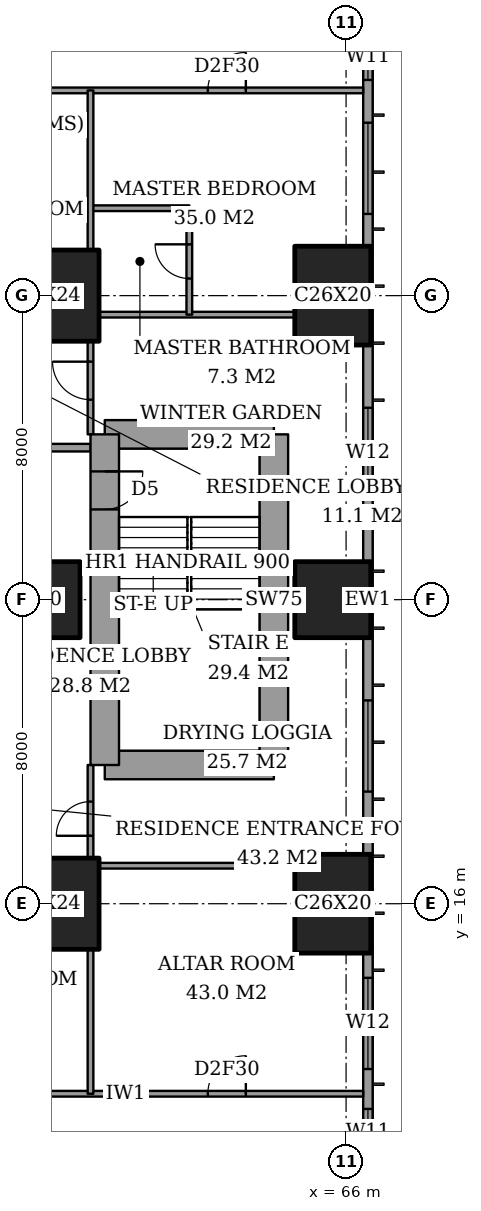
"""IFC4 building model, lengths in metres.
Left out: names, types, materials, properties, quantities, classifications, styles, units other than length and angle.
Written with IfcOpenShell. Run it as: python <this file> out.ifc"""

import sys

from ifc_helpers import new_model, si_unit, direction, frame, frame_2d, origin, origin_2d, place, context, subcontext, project, spatial, rectangle, extrude, element, fill, save


model = new_model("IFC4")
c1 = context("Model", 3, precision=1e-05, world=origin(), true_north=direction((0.0, 1.0)))
c2 = subcontext(c1, "Body", "Model", "MODEL_VIEW")
j1 = project(units=[si_unit("LENGTHUNIT", "METRE"), si_unit("PLANEANGLEUNIT", "RADIAN")], contexts=[c1])
p1 = place(None, origin())
s1 = spatial("IfcSite", under=j1, at=p1, CompositionType="ELEMENT")
p2 = place(p1, origin())
s2 = spatial("IfcBuilding", under=s1, at=p2, CompositionType="ELEMENT")
p3 = place(p2, frame((0.0, 0.0, 161.0)))
s3 = spatial("IfcBuildingStorey", under=s2, at=p3, CompositionType="ELEMENT", Elevation=161.0)
p4 = place(p3, frame((58.0, 16.0, 0.0), z_axis=(0.0, 0.0, 1.0), x_axis=(1.0, 0.0, 0.0)))
e1 = element("IfcColumn", 1, at=p4, inside=s3, PredefinedType="COLUMN", context=c2, shape_type="SweptSolid", body=[
    extrude(rectangle(XDim=3.0, YDim=2.4, at=origin_2d()), origin(), (0.0, 0.0, 1.0), 3.6),
])
p5 = place(p3, frame((58.0, 24.0, 0.0), z_axis=(0.0, 0.0, 1.0), x_axis=(1.0, 0.0, 0.0)))
e2 = element("IfcColumn", 2, at=p5, inside=s3, PredefinedType="COLUMN", context=c2, shape_type="SweptSolid", body=[
    extrude(rectangle(XDim=2.0, YDim=2.0, at=origin_2d()), origin(), (0.0, 0.0, 1.0), 3.6),
])
p6 = place(p3, frame((58.0, 32.0, 0.0), z_axis=(0.0, 0.0, 1.0), x_axis=(1.0, 0.0, 0.0)))
e3 = element("IfcColumn", 3, at=p6, inside=s3, PredefinedType="COLUMN", context=c2, shape_type="SweptSolid", body=[
    extrude(rectangle(XDim=3.0, YDim=2.4, at=origin_2d()), origin(), (0.0, 0.0, 1.0), 3.6),
])
p7 = place(p3, frame((65.65, 16.0, 0.0), z_axis=(0.0, 0.0, 1.0), x_axis=(0.0, 1.0, 0.0)))
e4 = element("IfcColumn", 4, at=p7, inside=s3, PredefinedType="COLUMN", context=c2, shape_type="SweptSolid", body=[
    extrude(rectangle(XDim=2.6, YDim=2.0, at=origin_2d()), origin(), (0.0, 0.0, 1.0), 3.6),
])
p8 = place(p3, frame((65.65, 24.0, 0.0), z_axis=(0.0, 0.0, 1.0), x_axis=(1.0, 0.0, 0.0)))
e5 = element("IfcColumn", 5, at=p8, inside=s3, PredefinedType="COLUMN", context=c2, shape_type="SweptSolid", body=[
    extrude(rectangle(XDim=2.0, YDim=2.0, at=origin_2d()), origin(), (0.0, 0.0, 1.0), 3.6),
])
p9 = place(p3, frame((65.65, 32.0, 0.0), z_axis=(0.0, 0.0, 1.0), x_axis=(0.0, 1.0, 0.0)))
e6 = element("IfcColumn", 6, at=p9, inside=s3, PredefinedType="COLUMN", context=c2, shape_type="SweptSolid", body=[
    extrude(rectangle(XDim=2.6, YDim=2.0, at=origin_2d()), origin(), (0.0, 0.0, 1.0), 3.6),
])
p10 = place(p3, frame((59.65, 19.65, 0.0), z_axis=(0.0, 0.0, 1.0), x_axis=(1.0, 0.0, 0.0)))
e7 = element("IfcWall", 7, at=p10, inside=s3, PredefinedType="SHEAR", context=c2, shape_type="SweptSolid", body=[
    extrude(rectangle(XDim=4.45, YDim=0.75, at=frame_2d((2.225, 0.0))), origin(), (0.0, 0.0, 1.0), 3.6),
])
p11 = place(p3, frame((64.1, 19.65, 0.0), z_axis=(0.0, 0.0, 1.0), x_axis=(0.0, 1.0, 0.0)))
e8 = element("IfcWall", 8, at=p11, inside=s3, PredefinedType="SHEAR", context=c2, shape_type="SweptSolid", body=[
    extrude(rectangle(XDim=8.7, YDim=0.75, at=frame_2d((4.35, 0.0))), origin(), (0.0, 0.0, 1.0), 3.6),
])
p12 = place(p3, frame((64.1, 28.35, 0.0), z_axis=(0.0, 0.0, 1.0), x_axis=(-1.0, 0.0, 0.0)))
e9 = element("IfcWall", 9, at=p12, inside=s3, PredefinedType="SHEAR", context=c2, shape_type="SweptSolid", body=[
    extrude(rectangle(XDim=4.45, YDim=0.75, at=frame_2d((2.225, 0.0))), origin(), (0.0, 0.0, 1.0), 3.6),
])
p13 = place(p3, frame((59.65, 28.35, 0.0), z_axis=(0.0, 0.0, 1.0), x_axis=(0.0, -1.0, 0.0)))
e10 = element("IfcWall", 10, at=p13, inside=s3, PredefinedType="SHEAR", context=c2, shape_type="SweptSolid", body=[
    extrude(rectangle(XDim=8.7, YDim=0.75, at=frame_2d((4.35, 0.0))), origin(), (0.0, 0.0, 1.0), 3.6),
])
p14 = place(p13, frame((0.975, 0.0, 0.0)))
e11 = element("IfcOpeningElement", 11, at=p14, cuts=e10, PredefinedType="OPENING", context=c2, shape_type="SweptSolid", body=[
    extrude(rectangle(XDim=1.0, YDim=2.1, at=frame_2d((0.5, 1.05))), frame((0.0, 0.385, 0.0), z_axis=(0.0, -1.0, 0.0), x_axis=(1.0, 0.0, 0.0)), (0.0, 0.0, 1.0), 0.77),
])
p15 = place(p3, frame((66.575, 3.175, 0.0), z_axis=(0.0, 0.0, 1.0), x_axis=(0.0, 1.0, 0.0)))
e12 = element("IfcWall", 12, at=p15, inside=s3, PredefinedType="SOLIDWALL", context=c2, shape_type="SweptSolid", body=[
    extrude(rectangle(XDim=41.65, YDim=0.25, at=frame_2d((20.825, 0.0))), origin(), (0.0, 0.0, 1.0), 3.6),
])
p16 = place(p15, frame((0.775, 0.0, 0.4)))
e13 = element("IfcOpeningElement", 13, at=p16, cuts=e12, PredefinedType="OPENING", context=c2, shape_type="SweptSolid", body=[
    extrude(rectangle(XDim=2.4, YDim=2.2, at=frame_2d((1.2, 1.1))), frame((0.0, 0.135, 0.0), z_axis=(0.0, -1.0, 0.0), x_axis=(1.0, 0.0, 0.0)), (0.0, 0.0, 1.0), 0.27),
])
p17 = place(p15, frame((6.225, 0.0, 0.4)))
e14 = element("IfcOpeningElement", 14, at=p17, cuts=e12, PredefinedType="OPENING", context=c2, shape_type="SweptSolid", body=[
    extrude(rectangle(XDim=1.2, YDim=2.2, at=frame_2d((0.6, 1.1))), frame((0.0, 0.135, 0.0), z_axis=(0.0, -1.0, 0.0), x_axis=(1.0, 0.0, 0.0)), (0.0, 0.0, 1.0), 0.27),
])
p18 = place(p15, frame((8.475, 0.0, 0.4)))
e15 = element("IfcOpeningElement", 15, at=p18, cuts=e12, PredefinedType="OPENING", context=c2, shape_type="SweptSolid", body=[
    extrude(rectangle(XDim=2.4, YDim=2.2, at=frame_2d((1.2, 1.1))), frame((0.0, 0.135, 0.0), z_axis=(0.0, -1.0, 0.0), x_axis=(1.0, 0.0, 0.0)), (0.0, 0.0, 1.0), 0.27),
])
p19 = place(p15, frame((15.775, 0.0, 0.4)))
e16 = element("IfcOpeningElement", 16, at=p19, cuts=e12, PredefinedType="OPENING", context=c2, shape_type="SweptSolid", body=[
    extrude(rectangle(XDim=2.4, YDim=2.2, at=frame_2d((1.2, 1.1))), frame((0.0, 0.135, 0.0), z_axis=(0.0, -1.0, 0.0), x_axis=(1.0, 0.0, 0.0)), (0.0, 0.0, 1.0), 0.27),
])
p20 = place(p15, frame((23.475, 0.0, 0.4)))
e17 = element("IfcOpeningElement", 17, at=p20, cuts=e12, PredefinedType="OPENING", context=c2, shape_type="SweptSolid", body=[
    extrude(rectangle(XDim=2.4, YDim=2.2, at=frame_2d((1.2, 1.1))), frame((0.0, 0.135, 0.0), z_axis=(0.0, -1.0, 0.0), x_axis=(1.0, 0.0, 0.0)), (0.0, 0.0, 1.0), 0.27),
])
p21 = place(p15, frame((30.975, 0.0, 0.4)))
e18 = element("IfcOpeningElement", 18, at=p21, cuts=e12, PredefinedType="OPENING", context=c2, shape_type="SweptSolid", body=[
    extrude(rectangle(XDim=2.4, YDim=2.2, at=frame_2d((1.2, 1.1))), frame((0.0, 0.135, 0.0), z_axis=(0.0, -1.0, 0.0), x_axis=(1.0, 0.0, 0.0)), (0.0, 0.0, 1.0), 0.27),
])
p22 = place(p15, frame((34.5, 0.0, 0.4)))
e19 = element("IfcOpeningElement", 19, at=p22, cuts=e12, PredefinedType="OPENING", context=c2, shape_type="SweptSolid", body=[
    extrude(rectangle(XDim=1.2, YDim=2.2, at=frame_2d((0.6, 1.1))), frame((0.0, 0.135, 0.0), z_axis=(0.0, -1.0, 0.0), x_axis=(1.0, 0.0, 0.0)), (0.0, 0.0, 1.0), 0.27),
])
p23 = place(p15, frame((38.475, 0.0, 0.4)))
e20 = element("IfcOpeningElement", 20, at=p23, cuts=e12, PredefinedType="OPENING", context=c2, shape_type="SweptSolid", body=[
    extrude(rectangle(XDim=2.4, YDim=2.2, at=frame_2d((1.2, 1.1))), frame((0.0, 0.135, 0.0), z_axis=(0.0, -1.0, 0.0), x_axis=(1.0, 0.0, 0.0)), (0.0, 0.0, 1.0), 0.27),
])
p24 = place(p3, frame((41.439, 11.0, 0.0), z_axis=(0.0, 0.0, 1.0), x_axis=(1.0, 0.0, 0.0)))
e21 = element("IfcWall", 21, at=p24, inside=s3, PredefinedType="PARTITIONING", context=c2, shape_type="SweptSolid", body=[
    extrude(rectangle(XDim=25.011, YDim=0.15, at=frame_2d((12.505, 0.0))), origin(), (0.0, 0.0, 1.0), 3.35),
])
p25 = place(p24, frame((12.361, 0.0, 0.0)))
e22 = element("IfcOpeningElement", 22, at=p25, cuts=e21, PredefinedType="OPENING", context=c2, shape_type="SweptSolid", body=[
    extrude(rectangle(XDim=1.0, YDim=2.1, at=frame_2d((0.5, 1.05))), frame((0.0, 0.085, 0.0), z_axis=(0.0, -1.0, 0.0), x_axis=(1.0, 0.0, 0.0)), (0.0, 0.0, 1.0), 0.17),
])
p26 = place(p24, frame((20.924, 0.0, 0.0)))
e23 = element("IfcOpeningElement", 23, at=p26, cuts=e21, PredefinedType="OPENING", context=c2, shape_type="SweptSolid", body=[
    extrude(rectangle(XDim=1.0, YDim=2.1, at=frame_2d((0.5, 1.05))), frame((0.0, 0.085, 0.0), z_axis=(0.0, -1.0, 0.0), x_axis=(1.0, 0.0, 0.0)), (0.0, 0.0, 1.0), 0.17),
])
p27 = place(p24, frame((15.448, 0.0, 0.0)))
e24 = element("IfcOpeningElement", 24, at=p27, cuts=e21, PredefinedType="OPENING", context=c2, shape_type="SweptSolid", body=[
    extrude(rectangle(XDim=0.9, YDim=2.1, at=frame_2d((0.45, 1.05))), frame((0.0, 0.085, 0.0), z_axis=(0.0, -1.0, 0.0), x_axis=(1.0, 0.0, 0.0)), (0.0, 0.0, 1.0), 0.17),
])
p28 = place(p24, frame((9.961, 0.0, 0.0)))
e25 = element("IfcOpeningElement", 25, at=p28, cuts=e21, PredefinedType="OPENING", context=c2, shape_type="SweptSolid", body=[
    extrude(rectangle(XDim=1.0, YDim=2.1, at=frame_2d((0.5, 1.05))), frame((0.0, 0.085, 0.0), z_axis=(0.0, -1.0, 0.0), x_axis=(1.0, 0.0, 0.0)), (0.0, 0.0, 1.0), 0.17),
])
p29 = place(p24, frame((7.411, 0.0, 0.0)))
e26 = element("IfcOpeningElement", 26, at=p29, cuts=e21, PredefinedType="OPENING", context=c2, shape_type="SweptSolid", body=[
    extrude(rectangle(XDim=0.9, YDim=2.1, at=frame_2d((0.45, 1.05))), frame((0.0, 0.085, 0.0), z_axis=(0.0, -1.0, 0.0), x_axis=(1.0, 0.0, 0.0)), (0.0, 0.0, 1.0), 0.17),
])
p30 = place(p24, frame((2.836, 0.0, 0.0)))
e27 = element("IfcOpeningElement", 27, at=p30, cuts=e21, PredefinedType="OPENING", context=c2, shape_type="SweptSolid", body=[
    extrude(rectangle(XDim=1.0, YDim=2.1, at=frame_2d((0.5, 1.05))), frame((0.0, 0.085, 0.0), z_axis=(0.0, -1.0, 0.0), x_axis=(1.0, 0.0, 0.0)), (0.0, 0.0, 1.0), 0.17),
])
p31 = place(p3, frame((59.5, 17.0, 0.0), z_axis=(0.0, 0.0, 1.0), x_axis=(1.0, 0.0, 0.0)))
e28 = element("IfcWall", 28, at=p31, inside=s3, PredefinedType="PARTITIONING", context=c2, shape_type="SweptSolid", body=[
    extrude(rectangle(XDim=5.15, YDim=0.15, at=frame_2d((2.575, 0.0))), origin(), (0.0, 0.0, 1.0), 3.35),
])
p32 = place(p3, frame((42.0, 28.0, 0.0), z_axis=(0.0, 0.0, 1.0), x_axis=(1.0, 0.0, 0.0)))
e29 = element("IfcWall", 29, at=p32, inside=s3, PredefinedType="PARTITIONING", context=c2, shape_type="SweptSolid", body=[
    extrude(rectangle(XDim=17.275, YDim=0.2, at=frame_2d((8.637, 0.0))), origin(), (0.0, 0.0, 1.0), 3.35),
])
p33 = place(p32, frame((9.1, 0.0, 0.0)))
e30 = element("IfcOpeningElement", 30, at=p33, cuts=e29, PredefinedType="OPENING", context=c2, shape_type="SweptSolid", body=[
    extrude(rectangle(XDim=1.2, YDim=2.4, at=frame_2d((0.6, 1.2))), frame((0.0, 0.11, 0.0), z_axis=(0.0, -1.0, 0.0), x_axis=(1.0, 0.0, 0.0)), (0.0, 0.0, 1.0), 0.22),
])
p34 = place(p3, frame((59.5, 31.5, 0.0), z_axis=(0.0, 0.0, 1.0), x_axis=(1.0, 0.0, 0.0)))
e31 = element("IfcWall", 31, at=p34, inside=s3, PredefinedType="PARTITIONING", context=c2, shape_type="SweptSolid", body=[
    extrude(rectangle(XDim=5.15, YDim=0.15, at=frame_2d((2.575, 0.0))), origin(), (0.0, 0.0, 1.0), 3.35),
])
p35 = place(p3, frame((59.275, 34.3, 0.0), z_axis=(0.0, 0.0, 1.0), x_axis=(1.0, 0.0, 0.0)))
e32 = element("IfcWall", 32, at=p35, inside=s3, PredefinedType="PARTITIONING", context=c2, shape_type="SweptSolid", body=[
    extrude(rectangle(XDim=2.6, YDim=0.15, at=frame_2d((1.3, 0.0))), origin(), (0.0, 0.0, 1.0), 3.35),
])
p36 = place(p3, frame((41.439, 37.4, 0.0), z_axis=(0.0, 0.0, 1.0), x_axis=(1.0, 0.0, 0.0)))
e33 = element("IfcWall", 33, at=p36, inside=s3, PredefinedType="PARTITIONING", context=c2, shape_type="SweptSolid", body=[
    extrude(rectangle(XDim=25.011, YDim=0.15, at=frame_2d((12.505, 0.0))), origin(), (0.0, 0.0, 1.0), 3.35),
])
p37 = place(p36, frame((12.361, 0.0, 0.0)))
e34 = element("IfcOpeningElement", 34, at=p37, cuts=e33, PredefinedType="OPENING", context=c2, shape_type="SweptSolid", body=[
    extrude(rectangle(XDim=1.0, YDim=2.1, at=frame_2d((0.5, 1.05))), frame((0.0, 0.085, 0.0), z_axis=(0.0, -1.0, 0.0), x_axis=(1.0, 0.0, 0.0)), (0.0, 0.0, 1.0), 0.17),
])
p38 = place(p36, frame((20.924, 0.0, 0.0)))
e35 = element("IfcOpeningElement", 35, at=p38, cuts=e33, PredefinedType="OPENING", context=c2, shape_type="SweptSolid", body=[
    extrude(rectangle(XDim=1.0, YDim=2.1, at=frame_2d((0.5, 1.05))), frame((0.0, 0.085, 0.0), z_axis=(0.0, -1.0, 0.0), x_axis=(1.0, 0.0, 0.0)), (0.0, 0.0, 1.0), 0.17),
])
p39 = place(p36, frame((15.448, 0.0, 0.0)))
e36 = element("IfcOpeningElement", 36, at=p39, cuts=e33, PredefinedType="OPENING", context=c2, shape_type="SweptSolid", body=[
    extrude(rectangle(XDim=0.9, YDim=2.1, at=frame_2d((0.45, 1.05))), frame((0.0, 0.085, 0.0), z_axis=(0.0, -1.0, 0.0), x_axis=(1.0, 0.0, 0.0)), (0.0, 0.0, 1.0), 0.17),
])
p40 = place(p36, frame((8.661, 0.0, 0.0)))
e37 = element("IfcOpeningElement", 37, at=p40, cuts=e33, PredefinedType="OPENING", context=c2, shape_type="SweptSolid", body=[
    extrude(rectangle(XDim=1.0, YDim=2.1, at=frame_2d((0.5, 1.05))), frame((0.0, 0.085, 0.0), z_axis=(0.0, -1.0, 0.0), x_axis=(1.0, 0.0, 0.0)), (0.0, 0.0, 1.0), 0.17),
])
p41 = place(p36, frame((2.836, 0.0, 0.0)))
e38 = element("IfcOpeningElement", 38, at=p41, cuts=e33, PredefinedType="OPENING", context=c2, shape_type="SweptSolid", body=[
    extrude(rectangle(XDim=1.0, YDim=2.1, at=frame_2d((0.5, 1.05))), frame((0.0, 0.085, 0.0), z_axis=(0.0, -1.0, 0.0), x_axis=(1.0, 0.0, 0.0)), (0.0, 0.0, 1.0), 0.17),
])
p42 = place(p3, frame((59.275, 11.0, 0.0), z_axis=(0.0, 0.0, 1.0), x_axis=(0.0, 1.0, 0.0)))
e39 = element("IfcWall", 39, at=p42, inside=s3, PredefinedType="PARTITIONING", context=c2, shape_type="SweptSolid", body=[
    extrude(rectangle(XDim=3.8, YDim=0.15, at=frame_2d((1.9, 0.0))), origin(), (0.0, 0.0, 1.0), 3.35),
])
p43 = place(p3, frame((59.275, 17.2, 0.0), z_axis=(0.0, 0.0, 1.0), x_axis=(0.0, 1.0, 0.0)))
e40 = element("IfcWall", 40, at=p43, inside=s3, PredefinedType="PARTITIONING", context=c2, shape_type="SweptSolid", body=[
    extrude(rectangle(XDim=2.45, YDim=0.15, at=frame_2d((1.225, 0.0))), origin(), (0.0, 0.0, 1.0), 3.35),
])
p44 = place(p43, frame((0.587, 0.0, 0.0)))
e41 = element("IfcOpeningElement", 41, at=p44, cuts=e40, PredefinedType="OPENING", context=c2, shape_type="SweptSolid", body=[
    extrude(rectangle(XDim=0.9, YDim=2.1, at=frame_2d((0.45, 1.05))), frame((0.0, 0.085, 0.0), z_axis=(0.0, -1.0, 0.0), x_axis=(1.0, 0.0, 0.0)), (0.0, 0.0, 1.0), 0.17),
])
p45 = place(p3, frame((59.275, 28.35, 0.0), z_axis=(0.0, 0.0, 1.0), x_axis=(0.0, 1.0, 0.0)))
e42 = element("IfcWall", 42, at=p45, inside=s3, PredefinedType="PARTITIONING", context=c2, shape_type="SweptSolid", body=[
    extrude(rectangle(XDim=2.45, YDim=0.15, at=frame_2d((1.225, 0.0))), origin(), (0.0, 0.0, 1.0), 3.35),
])
p46 = place(p45, frame((0.913, 0.0, 0.0)))
e43 = element("IfcOpeningElement", 43, at=p46, cuts=e42, PredefinedType="OPENING", context=c2, shape_type="SweptSolid", body=[
    extrude(rectangle(XDim=1.0, YDim=2.1, at=frame_2d((0.5, 1.05))), frame((0.0, 0.085, 0.0), z_axis=(0.0, -1.0, 0.0), x_axis=(1.0, 0.0, 0.0)), (0.0, 0.0, 1.0), 0.17),
])
p47 = place(p3, frame((59.275, 33.2, 0.0), z_axis=(0.0, 0.0, 1.0), x_axis=(0.0, 1.0, 0.0)))
e44 = element("IfcWall", 44, at=p47, inside=s3, PredefinedType="PARTITIONING", context=c2, shape_type="SweptSolid", body=[
    extrude(rectangle(XDim=4.2, YDim=0.15, at=frame_2d((2.1, 0.0))), origin(), (0.0, 0.0, 1.0), 3.35),
])
p48 = place(p3, frame((61.875, 31.5, 0.0), z_axis=(0.0, 0.0, 1.0), x_axis=(0.0, 1.0, 0.0)))
e45 = element("IfcWall", 45, at=p48, inside=s3, PredefinedType="PARTITIONING", context=c2, shape_type="SweptSolid", body=[
    extrude(rectangle(XDim=2.8, YDim=0.15, at=frame_2d((1.4, 0.0))), origin(), (0.0, 0.0, 1.0), 3.35),
])
p49 = place(p48, frame((0.95, 0.0, 0.0)))
e46 = element("IfcOpeningElement", 46, at=p49, cuts=e45, PredefinedType="OPENING", context=c2, shape_type="SweptSolid", body=[
    extrude(rectangle(XDim=0.9, YDim=2.1, at=frame_2d((0.45, 1.05))), frame((0.0, 0.085, 0.0), z_axis=(0.0, -1.0, 0.0), x_axis=(1.0, 0.0, 0.0)), (0.0, 0.0, 1.0), 0.17),
])
p50 = place(p17, origin())
e47 = element("IfcWindow", 47, at=p50, inside=s3, PartitioningType="SINGLE_PANEL", PredefinedType="WINDOW", context=c2, shape_type="SweptSolid", body=[
    extrude(rectangle(XDim=1.2, YDim=2.2, at=frame_2d((0.6, 1.1))), frame((0.0, 0.03, 0.0), z_axis=(0.0, -1.0, 0.0), x_axis=(1.0, 0.0, 0.0)), (0.0, 0.0, 1.0), 0.06),
])
fill(e14, e47)
p51 = place(p18, origin())
e48 = element("IfcWindow", 48, at=p51, inside=s3, PartitioningType="SINGLE_PANEL", PredefinedType="WINDOW", context=c2, shape_type="SweptSolid", body=[
    extrude(rectangle(XDim=2.4, YDim=2.2, at=frame_2d((1.2, 1.1))), frame((0.0, 0.03, 0.0), z_axis=(0.0, -1.0, 0.0), x_axis=(1.0, 0.0, 0.0)), (0.0, 0.0, 1.0), 0.06),
])
fill(e15, e48)
p52 = place(p19, origin())
e49 = element("IfcWindow", 49, at=p52, inside=s3, PartitioningType="SINGLE_PANEL", PredefinedType="WINDOW", context=c2, shape_type="SweptSolid", body=[
    extrude(rectangle(XDim=2.4, YDim=2.2, at=frame_2d((1.2, 1.1))), frame((0.0, 0.03, 0.0), z_axis=(0.0, -1.0, 0.0), x_axis=(1.0, 0.0, 0.0)), (0.0, 0.0, 1.0), 0.06),
])
fill(e16, e49)
p53 = place(p20, origin())
e50 = element("IfcWindow", 50, at=p53, inside=s3, PartitioningType="SINGLE_PANEL", PredefinedType="WINDOW", context=c2, shape_type="SweptSolid", body=[
    extrude(rectangle(XDim=2.4, YDim=2.2, at=frame_2d((1.2, 1.1))), frame((0.0, 0.03, 0.0), z_axis=(0.0, -1.0, 0.0), x_axis=(1.0, 0.0, 0.0)), (0.0, 0.0, 1.0), 0.06),
])
fill(e17, e50)
p54 = place(p21, origin())
e51 = element("IfcWindow", 51, at=p54, inside=s3, PartitioningType="SINGLE_PANEL", PredefinedType="WINDOW", context=c2, shape_type="SweptSolid", body=[
    extrude(rectangle(XDim=2.4, YDim=2.2, at=frame_2d((1.2, 1.1))), frame((0.0, 0.03, 0.0), z_axis=(0.0, -1.0, 0.0), x_axis=(1.0, 0.0, 0.0)), (0.0, 0.0, 1.0), 0.06),
])
fill(e18, e51)
p55 = place(p22, origin())
e52 = element("IfcWindow", 52, at=p55, inside=s3, PartitioningType="SINGLE_PANEL", PredefinedType="WINDOW", context=c2, shape_type="SweptSolid", body=[
    extrude(rectangle(XDim=1.2, YDim=2.2, at=frame_2d((0.6, 1.1))), frame((0.0, 0.03, 0.0), z_axis=(0.0, -1.0, 0.0), x_axis=(1.0, 0.0, 0.0)), (0.0, 0.0, 1.0), 0.06),
])
fill(e19, e52)
p56 = place(p26, origin())
e53 = element("IfcDoor", 53, at=p56, inside=s3, OperationType="SINGLE_SWING_LEFT", PredefinedType="DOOR", context=c2, shape_type="SweptSolid", body=[
    extrude(rectangle(XDim=1.0, YDim=2.1, at=frame_2d((0.5, 1.05))), frame((0.0, 0.025, 0.0), z_axis=(0.0, -1.0, 0.0), x_axis=(1.0, 0.0, 0.0)), (0.0, 0.0, 1.0), 0.05),
])
fill(e23, e53)
p57 = place(p44, origin())
e54 = element("IfcDoor", 54, at=p57, inside=s3, OperationType="SINGLE_SWING_RIGHT", PredefinedType="DOOR", context=c2, shape_type="SweptSolid", body=[
    extrude(rectangle(XDim=0.9, YDim=2.1, at=frame_2d((0.45, 1.05))), frame((0.0, 0.025, 0.0), z_axis=(0.0, -1.0, 0.0), x_axis=(1.0, 0.0, 0.0)), (0.0, 0.0, 1.0), 0.05),
])
fill(e41, e54)
p58 = place(p49, origin())
e55 = element("IfcDoor", 55, at=p58, inside=s3, OperationType="SINGLE_SWING_LEFT", PredefinedType="DOOR", context=c2, shape_type="SweptSolid", body=[
    extrude(rectangle(XDim=0.9, YDim=2.1, at=frame_2d((0.45, 1.05))), frame((0.0, 0.025, 0.0), z_axis=(0.0, -1.0, 0.0), x_axis=(1.0, 0.0, 0.0)), (0.0, 0.0, 1.0), 0.05),
])
fill(e46, e55)
p59 = place(p38, origin())
e56 = element("IfcDoor", 56, at=p59, inside=s3, OperationType="SINGLE_SWING_LEFT", PredefinedType="DOOR", context=c2, shape_type="SweptSolid", body=[
    extrude(rectangle(XDim=1.0, YDim=2.1, at=frame_2d((0.5, 1.05))), frame((0.0, 0.025, 0.0), z_axis=(0.0, -1.0, 0.0), x_axis=(1.0, 0.0, 0.0)), (0.0, 0.0, 1.0), 0.05),
])
fill(e35, e56)
p60 = place(p46, origin())
e57 = element("IfcDoor", 57, at=p60, inside=s3, OperationType="SINGLE_SWING_LEFT", PredefinedType="DOOR", context=c2, shape_type="SweptSolid", body=[
    extrude(rectangle(XDim=1.0, YDim=2.1, at=frame_2d((0.5, 1.05))), frame((0.0, 0.025, 0.0), z_axis=(0.0, -1.0, 0.0), x_axis=(1.0, 0.0, 0.0)), (0.0, 0.0, 1.0), 0.05),
])
fill(e43, e57)
p61 = place(p14, origin())
e58 = element("IfcDoor", 58, at=p61, inside=s3, OperationType="SINGLE_SWING_RIGHT", PredefinedType="DOOR", context=c2, shape_type="SweptSolid", body=[
    extrude(rectangle(XDim=1.0, YDim=2.1, at=frame_2d((0.5, 1.05))), frame((0.0, 0.025, 0.0), z_axis=(0.0, -1.0, 0.0), x_axis=(1.0, 0.0, 0.0)), (0.0, 0.0, 1.0), 0.05),
])
fill(e11, e58)
save(model, sys.argv[1])
